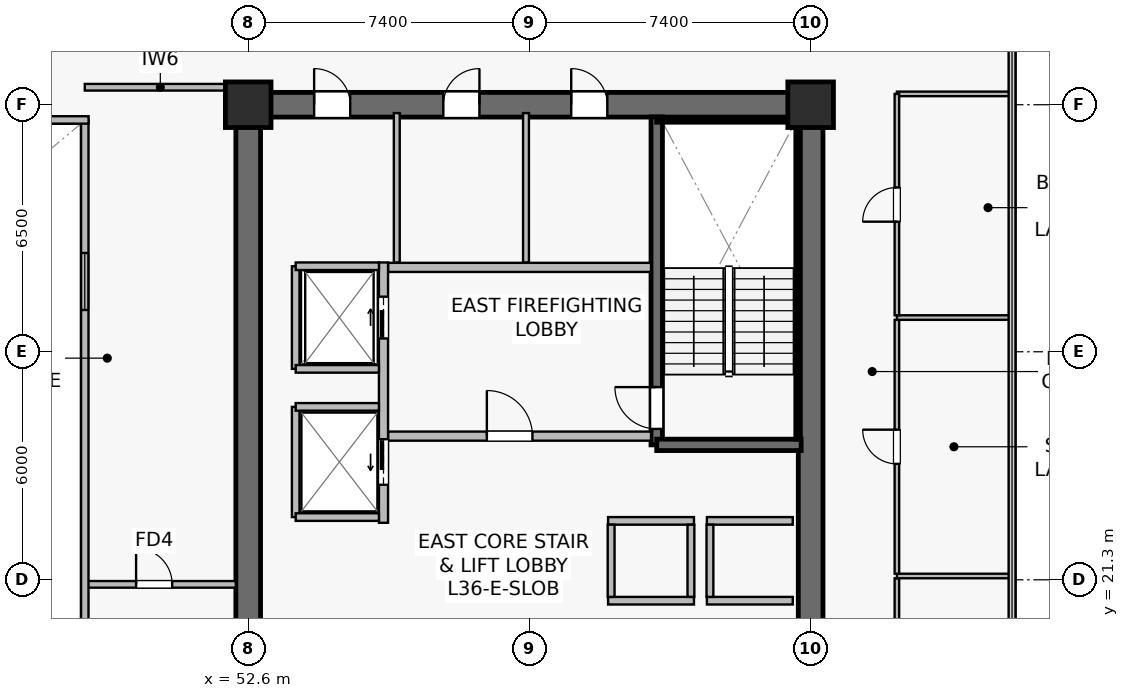
"""IFC4 building model, lengths in metres.
Left out: names, types, materials, properties, quantities, classifications, styles, units other than length and angle.
Written with IfcOpenShell. Run it as: python <this file> out.ifc"""

import sys

from ifc_helpers import new_model, si_unit, direction, frame, frame_2d, origin, origin_2d, place, context, subcontext, project, spatial, rectangle, extrude, source, transform, mapped, element, fill, save


model = new_model("IFC4")
c1 = context("Model", 3, precision=1e-05, world=origin(), true_north=direction((0.0, 1.0)))
c2 = subcontext(c1, "Body", "Model", "MODEL_VIEW")
j1 = project(units=[si_unit("LENGTHUNIT", "METRE"), si_unit("PLANEANGLEUNIT", "RADIAN")], contexts=[c1])
p1 = place(None, origin())
s1 = spatial("IfcSite", under=j1, at=p1, CompositionType="ELEMENT")
p2 = place(p1, origin())
s2 = spatial("IfcBuilding", under=s1, at=p2, CompositionType="ELEMENT")
p3 = place(p2, frame((0.0, 0.0, 150.2)))
s3 = spatial("IfcBuildingStorey", under=s2, at=p3, CompositionType="ELEMENT", Elevation=150.2)
p4 = place(p3, frame((52.275, 33.8, 0.0), z_axis=(0.0, 0.0, 1.0), x_axis=(1.0, 0.0, 0.0)))
e1 = element("IfcWall", 1, at=p4, inside=s3, PredefinedType="SHEAR", context=c2, shape_type="SweptSolid", body=[
    extrude(rectangle(XDim=15.45, YDim=0.65, at=frame_2d((7.725, 0.0))), origin(), (0.0, 0.0, 1.0), 3.79),
])
p5 = place(p4, frame((8.825, 0.0, 0.0)))
e2 = element("IfcOpeningElement", 2, at=p5, cuts=e1, PredefinedType="OPENING", context=c2, shape_type="SweptSolid", body=[
    extrude(rectangle(XDim=0.95, YDim=2.15, at=frame_2d((0.475, 1.075))), frame((0.0, 0.335, 0.0), z_axis=(0.0, -1.0, 0.0), x_axis=(1.0, 0.0, 0.0)), (0.0, 0.0, 1.0), 0.67),
])
p6 = place(p4, frame((5.46, 0.0, 0.0)))
e3 = element("IfcOpeningElement", 3, at=p6, cuts=e1, PredefinedType="OPENING", context=c2, shape_type="SweptSolid", body=[
    extrude(rectangle(XDim=0.95, YDim=2.15, at=frame_2d((0.475, 1.075))), frame((0.0, 0.335, 0.0), z_axis=(0.0, -1.0, 0.0), x_axis=(1.0, 0.0, 0.0)), (0.0, 0.0, 1.0), 0.67),
])
p7 = place(p4, frame((2.06, 0.0, 0.0)))
e4 = element("IfcOpeningElement", 4, at=p7, cuts=e1, PredefinedType="OPENING", context=c2, shape_type="SweptSolid", body=[
    extrude(rectangle(XDim=0.95, YDim=2.15, at=frame_2d((0.475, 1.075))), frame((0.0, 0.335, 0.0), z_axis=(0.0, -1.0, 0.0), x_axis=(1.0, 0.0, 0.0)), (0.0, 0.0, 1.0), 0.67),
])
p8 = place(p3, frame((52.6, 15.125, 0.0), z_axis=(0.0, 0.0, 1.0), x_axis=(0.0, 1.0, 0.0)))
e5 = element("IfcWall", 5, at=p8, inside=s3, PredefinedType="SHEAR", context=c2, shape_type="SweptSolid", body=[
    extrude(rectangle(XDim=18.35, YDim=0.65, at=frame_2d((9.175, 0.0))), origin(), (0.0, 0.0, 1.0), 3.79),
])
p9 = place(p8, frame((3.425, 0.0, 0.0)))
e6 = element("IfcOpeningElement", 6, at=p9, cuts=e5, PredefinedType="OPENING", context=c2, shape_type="SweptSolid", body=[
    extrude(rectangle(XDim=1.42, YDim=2.2, at=frame_2d((0.71, 1.1))), frame((0.0, 0.335, 0.0), z_axis=(0.0, -1.0, 0.0), x_axis=(1.0, 0.0, 0.0)), (0.0, 0.0, 1.0), 0.67),
])
p10 = place(p3, frame((67.4, 15.125, 0.0), z_axis=(0.0, 0.0, 1.0), x_axis=(0.0, 1.0, 0.0)))
e7 = element("IfcWall", 7, at=p10, inside=s3, PredefinedType="SHEAR", context=c2, shape_type="SweptSolid", body=[
    extrude(rectangle(XDim=18.35, YDim=0.65, at=frame_2d((9.175, 0.0))), origin(), (0.0, 0.0, 1.0), 3.79),
])
p11 = place(p3, frame((63.35, 24.85, 0.0), z_axis=(0.0, 0.0, 1.0), x_axis=(0.0, 1.0, 0.0)))
e8 = element("IfcWall", 8, at=p11, inside=s3, PredefinedType="SHEAR", context=c2, shape_type="SweptSolid", body=[
    extrude(rectangle(XDim=8.63, YDim=0.3, at=frame_2d((4.315, 0.0))), origin(), (0.0, 0.0, 1.0), 3.79),
])
p12 = place(p11, frame((0.42, 0.0, 0.0)))
e9 = element("IfcOpeningElement", 9, at=p12, cuts=e8, PredefinedType="OPENING", context=c2, shape_type="SweptSolid", body=[
    extrude(rectangle(XDim=1.1, YDim=2.15, at=frame_2d((0.55, 1.075))), frame((0.0, 0.16, 0.0), z_axis=(0.0, -1.0, 0.0), x_axis=(1.0, 0.0, 0.0)), (0.0, 0.0, 1.0), 0.32),
])
p13 = place(p3, frame((63.35, 24.85, 0.0), z_axis=(0.0, 0.0, 1.0), x_axis=(1.0, 0.0, 0.0)))
e10 = element("IfcWall", 10, at=p13, inside=s3, PredefinedType="SHEAR", context=c2, shape_type="SweptSolid", body=[
    extrude(rectangle(XDim=3.8, YDim=0.3, at=frame_2d((1.9, 0.0))), origin(), (0.0, 0.0, 1.0), 3.79),
])
p14 = place(p3, frame((63.35, 33.4, 0.0), z_axis=(0.0, 0.0, 1.0), x_axis=(1.0, 0.0, 0.0)))
e11 = element("IfcWall", 11, at=p14, inside=s3, PredefinedType="SOLIDWALL", context=c2, shape_type="SweptSolid", body=[
    extrude(rectangle(XDim=3.72, YDim=0.12, at=frame_2d((1.86, 0.0))), origin(), (0.0, 0.0, 1.0), 3.79),
])
p15 = place(p3, frame((67.07, 25.0, 0.0), z_axis=(0.0, 0.0, 1.0), x_axis=(0.0, 1.0, 0.0)))
e12 = element("IfcWall", 12, at=p15, inside=s3, PredefinedType="SOLIDWALL", context=c2, shape_type="SweptSolid", body=[
    extrude(rectangle(XDim=8.32, YDim=0.12, at=frame_2d((4.16, 0.0))), origin(), (0.0, 0.0, 1.0), 3.79),
])
m1 = source(origin(), c2, "Body", "SweptSolid", [
    extrude(rectangle(XDim=1.2, YDim=1.2, at=origin_2d()), origin(), (0.0, 0.0, 1.0), 4.1),
])
for number, where, z_axis, x_axis in (
    (13, (52.6, 33.8, 0.0), (0.0, 0.0, 1.0), (1.0, 0.0, 0.0)),
    (14, (67.4, 33.8, 0.0), (0.0, 0.0, 1.0), (1.0, 0.0, 0.0)),
):
    element("IfcColumn", number, at=place(p3, frame(where, z_axis=z_axis, x_axis=x_axis)), inside=s3, PredefinedType="COLUMN", context=c2, shape_type="MappedRepresentation", body=[
        mapped(m1, transform((0.0, 0.0, 0.0), scale=1.0)),
    ])
p16 = place(p3, frame((56.28, 25.08, 0.0), z_axis=(0.0, 0.0, 1.0), x_axis=(1.0, 0.0, 0.0)))
e15 = element("IfcWall", 15, at=p16, inside=s3, PredefinedType="SOLIDWALL", context=c2, shape_type="SweptSolid", body=[
    extrude(rectangle(XDim=6.92, YDim=0.24, at=frame_2d((3.46, 0.0))), origin(), (0.0, 0.0, 1.0), 3.187),
])
p17 = place(p16, frame((2.6, 0.0, 0.0)))
e16 = element("IfcOpeningElement", 16, at=p17, cuts=e15, PredefinedType="OPENING", context=c2, shape_type="SweptSolid", body=[
    extrude(rectangle(XDim=1.2, YDim=2.16, at=frame_2d((0.6, 1.08))), frame((0.0, 0.13, 0.0), z_axis=(0.0, -1.0, 0.0), x_axis=(1.0, 0.0, 0.0)), (0.0, 0.0, 1.0), 0.26),
])
p18 = place(p3, frame((56.28, 29.52, 0.0), z_axis=(0.0, 0.0, 1.0), x_axis=(1.0, 0.0, 0.0)))
e17 = element("IfcWall", 17, at=p18, inside=s3, PredefinedType="SOLIDWALL", context=c2, shape_type="SweptSolid", body=[
    extrude(rectangle(XDim=6.92, YDim=0.24, at=frame_2d((3.46, 0.0))), origin(), (0.0, 0.0, 1.0), 3.187),
])
p19 = place(p3, frame((56.16, 22.8, 0.0), z_axis=(0.0, 0.0, 1.0), x_axis=(0.0, 1.0, 0.0)))
e18 = element("IfcWall", 18, at=p19, inside=s3, PredefinedType="SOLIDWALL", context=c2, shape_type="SweptSolid", body=[
    extrude(rectangle(XDim=6.85, YDim=0.24, at=frame_2d((3.425, 0.0))), origin(), (0.0, 0.0, 1.0), 2.875),
])
p20 = place(p19, frame((4.85, 0.0, 0.0)))
e19 = element("IfcOpeningElement", 19, at=p20, cuts=e18, PredefinedType="OPENING", context=c2, shape_type="SweptSolid", body=[
    extrude(rectangle(XDim=1.1, YDim=2.22, at=frame_2d((0.55, 1.11))), frame((0.0, 0.13, 0.0), z_axis=(0.0, -1.0, 0.0), x_axis=(1.0, 0.0, 0.0)), (0.0, 0.0, 1.0), 0.26),
])
p21 = place(p19, frame((1.0, 0.0, 0.0)))
e20 = element("IfcOpeningElement", 20, at=p21, cuts=e18, PredefinedType="OPENING", context=c2, shape_type="SweptSolid", body=[
    extrude(rectangle(XDim=1.2, YDim=2.22, at=frame_2d((0.6, 1.11))), frame((0.0, 0.13, 0.0), z_axis=(0.0, -1.0, 0.0), x_axis=(1.0, 0.0, 0.0)), (0.0, 0.0, 1.0), 0.26),
])
for number, where, z_axis, x_axis in (
    (21, (64.67, 20.75, 0.0), (0.0, 0.0, 1.0), (1.0, 0.0, 0.0)),
    (22, (64.67, 22.85, 0.0), (0.0, 0.0, 1.0), (1.0, 0.0, 0.0)),
):
    element("IfcWall", number, at=place(p3, frame(where, z_axis=z_axis, x_axis=x_axis)), inside=s3, PredefinedType="SOLIDWALL", context=c2, shape_type="SweptSolid", body=[
        extrude(rectangle(XDim=2.26, YDim=0.2, at=frame_2d((1.13, 0.0))), origin(), (0.0, 0.0, 1.0), 3.79),
    ])
p22 = place(p3, frame((64.75, 20.85, 0.0), z_axis=(0.0, 0.0, 1.0), x_axis=(0.0, 1.0, 0.0)))
e23 = element("IfcWall", 23, at=p22, inside=s3, PredefinedType="SOLIDWALL", context=c2, shape_type="SweptSolid", body=[
    extrude(rectangle(XDim=1.9, YDim=0.18, at=frame_2d((0.95, 0.0))), origin(), (0.0, 0.0, 1.0), 3.79),
])
for number, where, z_axis, x_axis in (
    (24, (62.07, 20.75, 0.0), (0.0, 0.0, 1.0), (1.0, 0.0, 0.0)),
    (25, (62.07, 22.85, 0.0), (0.0, 0.0, 1.0), (1.0, 0.0, 0.0)),
):
    element("IfcWall", number, at=place(p3, frame(where, z_axis=z_axis, x_axis=x_axis)), inside=s3, PredefinedType="SOLIDWALL", context=c2, shape_type="SweptSolid", body=[
        extrude(rectangle(XDim=2.26, YDim=0.2, at=frame_2d((1.13, 0.0))), origin(), (0.0, 0.0, 1.0), 3.79),
    ])
for number, where, z_axis, x_axis in (
    (26, (62.15, 20.85, 0.0), (0.0, 0.0, 1.0), (0.0, 1.0, 0.0)),
    (27, (64.25, 20.85, 0.0), (0.0, 0.0, 1.0), (0.0, 1.0, 0.0)),
):
    element("IfcWall", number, at=place(p3, frame(where, z_axis=z_axis, x_axis=x_axis)), inside=s3, PredefinedType="SOLIDWALL", context=c2, shape_type="SweptSolid", body=[
        extrude(rectangle(XDim=1.9, YDim=0.18, at=frame_2d((0.95, 0.0))), origin(), (0.0, 0.0, 1.0), 3.79),
    ])
p23 = place(p3, frame((53.85, 26.85, 0.0), z_axis=(0.0, 0.0, 1.0), x_axis=(0.0, 1.0, 0.0)))
e28 = element("IfcWall", 28, at=p23, inside=s3, PredefinedType="SOLIDWALL", context=c2, shape_type="SweptSolid", body=[
    extrude(rectangle(XDim=2.7, YDim=0.2, at=frame_2d((1.35, 0.0))), origin(), (0.0, 0.0, 1.0), 3.79),
])
p24 = place(p3, frame((53.85, 29.55, 0.0), z_axis=(0.0, 0.0, 1.0), x_axis=(1.0, 0.0, 0.0)))
e29 = element("IfcWall", 29, at=p24, inside=s3, PredefinedType="SOLIDWALL", context=c2, shape_type="SweptSolid", body=[
    extrude(rectangle(XDim=2.19, YDim=0.2, at=frame_2d((1.095, 0.0))), origin(), (0.0, 0.0, 1.0), 3.79),
])
p25 = place(p3, frame((53.85, 26.85, 0.0), z_axis=(0.0, 0.0, 1.0), x_axis=(1.0, 0.0, 0.0)))
e30 = element("IfcWall", 30, at=p25, inside=s3, PredefinedType="SOLIDWALL", context=c2, shape_type="SweptSolid", body=[
    extrude(rectangle(XDim=2.19, YDim=0.2, at=frame_2d((1.095, 0.0))), origin(), (0.0, 0.0, 1.0), 3.187),
])
p26 = place(p3, frame((53.85, 22.95, 0.0), z_axis=(0.0, 0.0, 1.0), x_axis=(0.0, 1.0, 0.0)))
e31 = element("IfcWall", 31, at=p26, inside=s3, PredefinedType="SOLIDWALL", context=c2, shape_type="SweptSolid", body=[
    extrude(rectangle(XDim=2.9, YDim=0.2, at=frame_2d((1.45, 0.0))), origin(), (0.0, 0.0, 1.0), 2.875),
])
for number, where, z_axis, x_axis in (
    (32, (53.85, 25.85, 0.0), (0.0, 0.0, 1.0), (1.0, 0.0, 0.0)),
    (33, (53.85, 22.95, 0.0), (0.0, 0.0, 1.0), (1.0, 0.0, 0.0)),
):
    element("IfcWall", number, at=place(p3, frame(where, z_axis=z_axis, x_axis=x_axis)), inside=s3, PredefinedType="SOLIDWALL", context=c2, shape_type="SweptSolid", body=[
        extrude(rectangle(XDim=2.19, YDim=0.2, at=frame_2d((1.095, 0.0))), origin(), (0.0, 0.0, 1.0), 3.79),
    ])
p27 = place(p3, frame((59.91, 29.65, 0.0), z_axis=(0.0, 0.0, 1.0), x_axis=(0.0, 1.0, 0.0)))
e34 = element("IfcWall", 34, at=p27, inside=s3, PredefinedType="PLUMBINGWALL", context=c2, shape_type="SweptSolid", body=[
    extrude(rectangle(XDim=3.93, YDim=0.155, at=frame_2d((1.965, 0.0))), origin(), (0.0, 0.0, 1.0), 3.187),
])
p28 = place(p3, frame((56.51, 29.65, 0.0), z_axis=(0.0, 0.0, 1.0), x_axis=(0.0, 1.0, 0.0)))
e35 = element("IfcWall", 35, at=p28, inside=s3, PredefinedType="PLUMBINGWALL", context=c2, shape_type="SweptSolid", body=[
    extrude(rectangle(XDim=3.93, YDim=0.155, at=frame_2d((1.965, 0.0))), origin(), (0.0, 0.0, 1.0), 3.79),
])
p29 = place(p3, frame((48.3, 34.26, 0.0), z_axis=(0.0, 0.0, 1.0), x_axis=(1.0, 0.0, 0.0)))
e36 = element("IfcWall", 36, at=p29, inside=s3, PredefinedType="PARTITIONING", context=c2, shape_type="SweptSolid", body=[
    extrude(rectangle(XDim=3.975, YDim=0.175, at=frame_2d((1.987, 0.0))), origin(), (0.0, 0.0, 1.0), 3.475),
])
p30 = place(p3, frame((48.3, 21.18, 0.0), z_axis=(0.0, 0.0, 1.0), x_axis=(1.0, 0.0, 0.0)))
e37 = element("IfcWall", 37, at=p30, inside=s3, PredefinedType="PARTITIONING", context=c2, shape_type="SweptSolid", body=[
    extrude(rectangle(XDim=3.975, YDim=0.175, at=frame_2d((1.987, 0.0))), origin(), (0.0, 0.0, 1.0), 3.79),
])
p31 = place(p30, frame((1.35, 0.0, 0.0)))
e38 = element("IfcOpeningElement", 38, at=p31, cuts=e37, PredefinedType="OPENING", context=c2, shape_type="SweptSolid", body=[
    extrude(rectangle(XDim=0.95, YDim=2.15, at=frame_2d((0.475, 1.075))), frame((0.0, 0.098, 0.0), z_axis=(0.0, -1.0, 0.0), x_axis=(1.0, 0.0, 0.0)), (0.0, 0.0, 1.0), 0.195),
])
p32 = place(p3, frame((48.3, 15.2, 0.0), z_axis=(0.0, 0.0, 1.0), x_axis=(0.0, 1.0, 0.0)))
e39 = element("IfcWall", 39, at=p32, inside=s3, PredefinedType="SOLIDWALL", context=c2, shape_type="SweptSolid", body=[
    extrude(rectangle(XDim=18.2, YDim=0.195, at=frame_2d((9.1, 0.0))), origin(), (0.0, 0.0, 1.0), 3.79),
])
p33 = place(p32, frame((1.8, 0.0, 0.9)))
e40 = element("IfcOpeningElement", 40, at=p33, cuts=e39, PredefinedType="OPENING", context=c2, shape_type="SweptSolid", body=[
    extrude(rectangle(XDim=1.5, YDim=1.4, at=frame_2d((0.75, 0.7))), frame((0.0, 0.107, 0.0), z_axis=(0.0, -1.0, 0.0), x_axis=(1.0, 0.0, 0.0)), (0.0, 0.0, 1.0), 0.215),
])
p34 = place(p32, frame((13.2, 0.0, 0.9)))
e41 = element("IfcOpeningElement", 41, at=p34, cuts=e39, PredefinedType="OPENING", context=c2, shape_type="SweptSolid", body=[
    extrude(rectangle(XDim=1.5, YDim=1.4, at=frame_2d((0.75, 0.7))), frame((0.0, 0.107, 0.0), z_axis=(0.0, -1.0, 0.0), x_axis=(1.0, 0.0, 0.0)), (0.0, 0.0, 1.0), 0.215),
])
p35 = place(p3, frame((26.4, 33.4, 0.0), z_axis=(0.0, 0.0, 1.0), x_axis=(1.0, 0.0, 0.0)))
e42 = element("IfcWall", 42, at=p35, inside=s3, PredefinedType="SOLIDWALL", context=c2, shape_type="SweptSolid", body=[
    extrude(rectangle(XDim=22.0, YDim=0.195, at=frame_2d((11.0, 0.0))), origin(), (0.0, 0.0, 1.0), 3.79),
])
p36 = place(p3, frame((69.67, 34.085, 0.0), z_axis=(0.0, 0.0, 1.0), x_axis=(1.0, 0.0, 0.0)))
e43 = element("IfcWall", 43, at=p36, inside=s3, PredefinedType="PARTITIONING", context=c2, shape_type="SweptSolid", body=[
    extrude(rectangle(XDim=3.02, YDim=0.12, at=frame_2d((1.51, 0.0))), origin(), (0.0, 0.0, 1.0), 3.79),
])
p37 = place(p3, frame((69.67, 14.515, 0.0), z_axis=(0.0, 0.0, 1.0), x_axis=(0.0, 1.0, 0.0)))
e44 = element("IfcWall", 44, at=p37, inside=s3, PredefinedType="PARTITIONING", context=c2, shape_type="SweptSolid", body=[
    extrude(rectangle(XDim=6.825, YDim=0.12, at=frame_2d((3.413, 0.0))), origin(), (0.0, 0.0, 1.0), 3.79),
])
p38 = place(p37, frame((2.962, 0.0, 0.0)))
e45 = element("IfcOpeningElement", 45, at=p38, cuts=e44, PredefinedType="OPENING", context=c2, shape_type="SweptSolid", body=[
    extrude(rectangle(XDim=0.9, YDim=2.1, at=frame_2d((0.45, 1.05))), frame((0.0, 0.07, 0.0), z_axis=(0.0, -1.0, 0.0), x_axis=(1.0, 0.0, 0.0)), (0.0, 0.0, 1.0), 0.14),
])
p39 = place(p3, frame((69.67, 21.4, 0.0), z_axis=(0.0, 0.0, 1.0), x_axis=(1.0, 0.0, 0.0)))
e46 = element("IfcWall", 46, at=p39, inside=s3, PredefinedType="PARTITIONING", context=c2, shape_type="SweptSolid", body=[
    extrude(rectangle(XDim=3.02, YDim=0.12, at=frame_2d((1.51, 0.0))), origin(), (0.0, 0.0, 1.0), 3.79),
])
p40 = place(p3, frame((69.67, 21.46, 0.0), z_axis=(0.0, 0.0, 1.0), x_axis=(0.0, 1.0, 0.0)))
e47 = element("IfcWall", 47, at=p40, inside=s3, PredefinedType="PARTITIONING", context=c2, shape_type="SweptSolid", body=[
    extrude(rectangle(XDim=6.68, YDim=0.12, at=frame_2d((3.34, 0.0))), origin(), (0.0, 0.0, 1.0), 3.79),
])
p41 = place(p40, frame((2.89, 0.0, 0.0)))
e48 = element("IfcOpeningElement", 48, at=p41, cuts=e47, PredefinedType="OPENING", context=c2, shape_type="SweptSolid", body=[
    extrude(rectangle(XDim=0.9, YDim=2.1, at=frame_2d((0.45, 1.05))), frame((0.0, 0.07, 0.0), z_axis=(0.0, -1.0, 0.0), x_axis=(1.0, 0.0, 0.0)), (0.0, 0.0, 1.0), 0.14),
])
p42 = place(p3, frame((69.67, 28.2, 0.0), z_axis=(0.0, 0.0, 1.0), x_axis=(1.0, 0.0, 0.0)))
e49 = element("IfcWall", 49, at=p42, inside=s3, PredefinedType="PARTITIONING", context=c2, shape_type="SweptSolid", body=[
    extrude(rectangle(XDim=3.02, YDim=0.12, at=frame_2d((1.51, 0.0))), origin(), (0.0, 0.0, 1.0), 3.79),
])
p43 = place(p3, frame((69.67, 28.26, 0.0), z_axis=(0.0, 0.0, 1.0), x_axis=(0.0, 1.0, 0.0)))
e50 = element("IfcWall", 50, at=p43, inside=s3, PredefinedType="PARTITIONING", context=c2, shape_type="SweptSolid", body=[
    extrude(rectangle(XDim=5.825, YDim=0.12, at=frame_2d((2.913, 0.0))), origin(), (0.0, 0.0, 1.0), 3.79),
])
p44 = place(p43, frame((2.462, 0.0, 0.0)))
e51 = element("IfcOpeningElement", 51, at=p44, cuts=e50, PredefinedType="OPENING", context=c2, shape_type="SweptSolid", body=[
    extrude(rectangle(XDim=0.9, YDim=2.1, at=frame_2d((0.45, 1.05))), frame((0.0, 0.07, 0.0), z_axis=(0.0, -1.0, 0.0), x_axis=(1.0, 0.0, 0.0)), (0.0, 0.0, 1.0), 0.14),
])
m2 = source(origin(), c2, "Body", "SweptSolid", [
    extrude(rectangle(XDim=1.5, YDim=1.4, at=frame_2d((0.75, 0.7))), frame((0.0, 0.03, 0.0), z_axis=(0.0, -1.0, 0.0), x_axis=(1.0, 0.0, 0.0)), (0.0, 0.0, 1.0), 0.06),
])
p45 = place(p34, origin())
e52 = element("IfcWindow", 52, at=p45, inside=s3, PartitioningType="SINGLE_PANEL", PredefinedType="WINDOW", context=c2, shape_type="MappedRepresentation", body=[
    mapped(m2, transform((0.0, 0.0, 0.0), scale=1.0)),
])
fill(e41, e52)
m3 = source(origin(), c2, "Body", "SweptSolid", [
    extrude(rectangle(XDim=1.1, YDim=2.15, at=frame_2d((0.55, 1.075))), frame((0.0, 0.025, 0.0), z_axis=(0.0, -1.0, 0.0), x_axis=(1.0, 0.0, 0.0)), (0.0, 0.0, 1.0), 0.05),
])
p46 = place(p12, origin())
e53 = element("IfcDoor", 53, at=p46, inside=s3, OperationType="SINGLE_SWING_RIGHT", PredefinedType="DOOR", context=c2, shape_type="MappedRepresentation", body=[
    mapped(m3, transform((0.0, 0.0, 0.0), scale=1.0)),
])
fill(e9, e53)
m4 = source(origin(), c2, "Body", "SweptSolid", [
    extrude(rectangle(XDim=1.2, YDim=2.16, at=frame_2d((0.6, 1.08))), frame((0.0, 0.025, 0.0), z_axis=(0.0, -1.0, 0.0), x_axis=(1.0, 0.0, 0.0)), (0.0, 0.0, 1.0), 0.05),
])
p47 = place(p17, origin())
e54 = element("IfcDoor", 54, at=p47, inside=s3, OperationType="SINGLE_SWING_LEFT", PredefinedType="DOOR", context=c2, shape_type="MappedRepresentation", body=[
    mapped(m4, transform((0.0, 0.0, 0.0), scale=1.0)),
])
fill(e16, e54)
m5 = source(origin(), c2, "Body", "SweptSolid", [
    extrude(rectangle(XDim=1.1, YDim=2.22, at=frame_2d((0.55, 1.11))), frame((0.0, 0.025, 0.0), z_axis=(0.0, -1.0, 0.0), x_axis=(1.0, 0.0, 0.0)), (0.0, 0.0, 1.0), 0.05),
])
p48 = place(p20, origin())
e55 = element("IfcDoor", 55, at=p48, inside=s3, OperationType="SLIDING_TO_RIGHT", PredefinedType="USERDEFINED", context=c2, shape_type="MappedRepresentation", body=[
    mapped(m5, transform((0.0, 0.0, 0.0), scale=1.0)),
])
fill(e19, e55)
m6 = source(origin(), c2, "Body", "SweptSolid", [
    extrude(rectangle(XDim=1.2, YDim=2.22, at=frame_2d((0.6, 1.11))), frame((0.0, 0.025, 0.0), z_axis=(0.0, -1.0, 0.0), x_axis=(1.0, 0.0, 0.0)), (0.0, 0.0, 1.0), 0.05),
])
p49 = place(p21, origin())
e56 = element("IfcDoor", 56, at=p49, inside=s3, OperationType="SLIDING_TO_LEFT", PredefinedType="USERDEFINED", context=c2, shape_type="MappedRepresentation", body=[
    mapped(m6, transform((0.0, 0.0, 0.0), scale=1.0)),
])
fill(e20, e56)
m7 = source(origin(), c2, "Body", "SweptSolid", [
    extrude(rectangle(XDim=0.95, YDim=2.15, at=frame_2d((0.475, 1.075))), frame((0.0, 0.025, 0.0), z_axis=(0.0, -1.0, 0.0), x_axis=(1.0, 0.0, 0.0)), (0.0, 0.0, 1.0), 0.05),
])
p50 = place(p5, origin())
e57 = element("IfcDoor", 57, at=p50, inside=s3, OperationType="SINGLE_SWING_LEFT", PredefinedType="DOOR", context=c2, shape_type="MappedRepresentation", body=[
    mapped(m7, transform((0.0, 0.0, 0.0), scale=1.0)),
])
fill(e2, e57)
p51 = place(p6, origin())
e58 = element("IfcDoor", 58, at=p51, inside=s3, OperationType="SINGLE_SWING_RIGHT", PredefinedType="DOOR", context=c2, shape_type="MappedRepresentation", body=[
    mapped(m7, transform((0.0, 0.0, 0.0), scale=1.0)),
])
fill(e3, e58)
p52 = place(p7, origin())
e59 = element("IfcDoor", 59, at=p52, inside=s3, OperationType="SINGLE_SWING_LEFT", PredefinedType="DOOR", context=c2, shape_type="MappedRepresentation", body=[
    mapped(m7, transform((0.0, 0.0, 0.0), scale=1.0)),
])
fill(e4, e59)
p53 = place(p31, origin())
e60 = element("IfcDoor", 60, at=p53, inside=s3, OperationType="SINGLE_SWING_LEFT", PredefinedType="DOOR", context=c2, shape_type="MappedRepresentation", body=[
    mapped(m7, transform((0.0, 0.0, 0.0), scale=1.0)),
])
fill(e38, e60)
m8 = source(origin(), c2, "Body", "SweptSolid", [
    extrude(rectangle(XDim=0.9, YDim=2.1, at=frame_2d((0.45, 1.05))), frame((0.0, 0.025, 0.0), z_axis=(0.0, -1.0, 0.0), x_axis=(1.0, 0.0, 0.0)), (0.0, 0.0, 1.0), 0.05),
])
p54 = place(p41, origin())
e61 = element("IfcDoor", 61, at=p54, inside=s3, OperationType="SINGLE_SWING_RIGHT", PredefinedType="DOOR", context=c2, shape_type="MappedRepresentation", body=[
    mapped(m8, transform((0.0, 0.0, 0.0), scale=1.0)),
])
fill(e48, e61)
p55 = place(p44, origin())
e62 = element("IfcDoor", 62, at=p55, inside=s3, OperationType="SINGLE_SWING_LEFT", PredefinedType="DOOR", context=c2, shape_type="MappedRepresentation", body=[
    mapped(m8, transform((0.0, 0.0, 0.0), scale=1.0)),
])
fill(e51, e62)
save(model, sys.argv[1])
